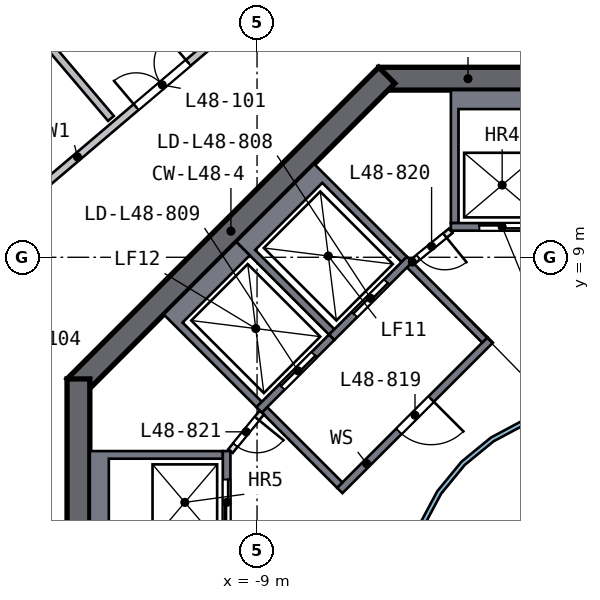
"""IFC4 building model, lengths in metres.
Left out: names, types, materials, properties, quantities, classifications, styles, units other than length and angle.
Written with IfcOpenShell. Run it as: python <this file> out.ifc"""

import sys

from ifc_helpers import new_model, si_unit, direction, frame, frame_2d, origin, place, context, subcontext, project, spatial, polyline, rectangle, outline, extrude, element, fill, save


model = new_model("IFC4")
c1 = context("Model", 3, precision=1e-05, world=origin(), true_north=direction((0.0, 1.0)))
c2 = subcontext(c1, "Body", "Model", "MODEL_VIEW")
j1 = project(units=[si_unit("LENGTHUNIT", "METRE"), si_unit("PLANEANGLEUNIT", "RADIAN")], contexts=[c1])
p1 = place(None, origin())
s1 = spatial("IfcSite", under=j1, at=p1, CompositionType="ELEMENT")
p2 = place(p1, origin())
s2 = spatial("IfcBuilding", under=s1, at=p2, CompositionType="ELEMENT")
p3 = place(p2, frame((0.0, 0.0, 197.5)))
s3 = spatial("IfcBuildingStorey", under=s2, at=p3, CompositionType="ELEMENT", Elevation=197.5)
p4 = place(p3, frame((5.799, 13.7, 0.0), z_axis=(0.0, 0.0, 1.0), x_axis=(-1.0, 0.0, 0.0)))
e1 = element("IfcWall", 1, at=p4, inside=s3, PredefinedType="SHEAR", context=c2, shape_type="SweptSolid", body=[
    extrude(rectangle(XDim=11.598, YDim=0.6, at=frame_2d((5.799, 0.0))), origin(), (0.0, 0.0, 1.0), 3.5),
])
p5 = place(p4, frame((4.899, 0.0, 0.0)))
e2 = element("IfcOpeningElement", 2, at=p5, cuts=e1, PredefinedType="OPENING", context=c2, shape_type="SweptSolid", body=[
    extrude(rectangle(XDim=1.8, YDim=2.1, at=frame_2d((0.9, 1.05))), frame((0.0, 0.31, 0.0), z_axis=(0.0, -1.0, 0.0), x_axis=(1.0, 0.0, 0.0)), (0.0, 0.0, 1.0), 0.62),
])
p6 = place(p3, frame((-5.587, 13.788, 0.0), z_axis=(0.0, 0.0, 1.0), x_axis=(-0.707106781, -0.707106781, 0.0)))
e3 = element("IfcWall", 3, at=p6, inside=s3, PredefinedType="SHEAR", context=c2, shape_type="SweptSolid", body=[
    extrude(rectangle(XDim=11.598, YDim=0.6, at=frame_2d((5.799, 0.0))), origin(), (0.0, 0.0, 1.0), 3.5),
])
p7 = place(p3, frame((-13.7, 5.799, 0.0), z_axis=(0.0, 0.0, 1.0), x_axis=(0.0, -1.0, 0.0)))
e4 = element("IfcWall", 4, at=p7, inside=s3, PredefinedType="SHEAR", context=c2, shape_type="SweptSolid", body=[
    extrude(rectangle(XDim=11.598, YDim=0.6, at=frame_2d((5.799, 0.0))), origin(), (0.0, 0.0, 1.0), 3.5),
])
p8 = place(p7, frame((4.899, 0.0, 0.0)))
e5 = element("IfcOpeningElement", 5, at=p8, cuts=e4, PredefinedType="OPENING", context=c2, shape_type="SweptSolid", body=[
    extrude(rectangle(XDim=1.8, YDim=2.1, at=frame_2d((0.9, 1.05))), frame((0.0, 0.31, 0.0), z_axis=(0.0, -1.0, 0.0), x_axis=(1.0, 0.0, 0.0)), (0.0, 0.0, 1.0), 0.62),
])
p9 = place(p3, origin())
e6 = element("IfcWall", 6, at=p9, inside=s3, PredefinedType="SOLIDWALL", context=c2, shape_type="SweptSolid", body=[
    extrude(outline(polyline([(-3.9, 13.4), (-1.2, 13.4), (-1.2, 9.9), (-1.4, 9.9), (-1.4, 12.9), (-3.7, 12.9), (-3.7, 9.9), (-3.9, 9.9), (-3.9, 13.4)])), origin(), (0.0, 0.0, 1.0), 3.19),
])
p10 = place(p3, frame((-1.2, 9.8, 0.0), z_axis=(0.0, 0.0, 1.0), x_axis=(-1.0, 0.0, 0.0)))
e7 = element("IfcWall", 7, at=p10, inside=s3, PredefinedType="SOLIDWALL", context=c2, shape_type="SweptSolid", body=[
    extrude(rectangle(XDim=2.7, YDim=0.2, at=frame_2d((1.35, 0.0))), origin(), (0.0, 0.0, 1.0), 3.19),
])
p11 = place(p10, frame((0.75, 0.0, 0.0)))
e8 = element("IfcOpeningElement", 8, at=p11, cuts=e7, PredefinedType="OPENING", context=c2, shape_type="SweptSolid", body=[
    extrude(rectangle(XDim=1.2, YDim=2.1, at=frame_2d((0.6, 1.05))), frame((0.0, 0.11, 0.0), z_axis=(0.0, -1.0, 0.0), x_axis=(1.0, 0.0, 0.0)), (0.0, 0.0, 1.0), 0.22),
])
p12 = place(p3, origin())
e9 = element("IfcWall", 9, at=p12, inside=s3, PredefinedType="SOLIDWALL", context=c2, shape_type="SweptSolid", body=[
    extrude(outline(polyline([(-13.4, 3.9), (-9.9, 3.9), (-9.9, 3.7), (-12.9, 3.7), (-12.9, 1.4), (-9.9, 1.4), (-9.9, 1.2), (-13.4, 1.2), (-13.4, 3.9)])), origin(), (0.0, 0.0, 1.0), 3.19),
])
p13 = place(p3, frame((-9.8, 1.2, 0.0), z_axis=(0.0, 0.0, 1.0), x_axis=(0.0, 1.0, 0.0)))
e10 = element("IfcWall", 10, at=p13, inside=s3, PredefinedType="SOLIDWALL", context=c2, shape_type="SweptSolid", body=[
    extrude(rectangle(XDim=2.7, YDim=0.2, at=frame_2d((1.35, 0.0))), origin(), (0.0, 0.0, 1.0), 3.19),
])
p14 = place(p13, frame((0.75, 0.0, 0.0)))
e11 = element("IfcOpeningElement", 11, at=p14, cuts=e10, PredefinedType="OPENING", context=c2, shape_type="SweptSolid", body=[
    extrude(rectangle(XDim=1.2, YDim=2.1, at=frame_2d((0.6, 1.05))), frame((0.0, 0.11, 0.0), z_axis=(0.0, -1.0, 0.0), x_axis=(1.0, 0.0, 0.0)), (0.0, 0.0, 1.0), 0.22),
])
p15 = place(p3, origin())
e12 = element("IfcWall", 12, at=p15, inside=s3, PredefinedType="SOLIDWALL", context=c2, shape_type="SweptSolid", body=[
    extrude(outline(polyline([(-9.546, 9.405), (-7.495, 11.455), (-5.056, 9.016), (-5.197, 8.874), (-7.283, 10.96), (-9.051, 9.192), (-6.965, 7.106), (-7.106, 6.965), (-9.546, 9.405)])), origin(), (0.0, 0.0, 1.0), 3.19),
])
p16 = place(p3, frame((-4.985, 8.945, 0.0), z_axis=(0.0, 0.0, 1.0), x_axis=(-0.707106781, -0.707106781, 0.0)))
e13 = element("IfcWall", 13, at=p16, inside=s3, PredefinedType="SOLIDWALL", context=c2, shape_type="SweptSolid", body=[
    extrude(rectangle(XDim=2.9, YDim=0.2, at=frame_2d((1.45, 0.0))), origin(), (0.0, 0.0, 1.0), 3.19),
])
p17 = place(p16, frame((0.85, 0.0, 0.0)))
e14 = element("IfcOpeningElement", 14, at=p17, cuts=e13, PredefinedType="OPENING", context=c2, shape_type="SweptSolid", body=[
    extrude(rectangle(XDim=1.2, YDim=2.1, at=frame_2d((0.6, 1.05))), frame((0.0, 0.11, 0.0), z_axis=(0.0, -1.0, 0.0), x_axis=(1.0, 0.0, 0.0)), (0.0, 0.0, 1.0), 0.22),
])
p18 = place(p3, origin())
e15 = element("IfcWall", 15, at=p18, inside=s3, PredefinedType="SOLIDWALL", context=c2, shape_type="SweptSolid", body=[
    extrude(outline(polyline([(-11.455, 7.495), (-9.546, 9.405), (-9.192, 9.051), (-10.96, 7.283), (-8.874, 5.197), (-9.016, 5.056), (-11.455, 7.495)])), origin(), (0.0, 0.0, 1.0), 3.19),
])
p19 = place(p3, frame((-7.036, 6.894, 0.0), z_axis=(0.0, 0.0, 1.0), x_axis=(-0.707106781, -0.707106781, 0.0)))
e16 = element("IfcWall", 16, at=p19, inside=s3, PredefinedType="SOLIDWALL", context=c2, shape_type="SweptSolid", body=[
    extrude(rectangle(XDim=2.7, YDim=0.2, at=frame_2d((1.35, 0.0))), origin(), (0.0, 0.0, 1.0), 3.19),
])
p20 = place(p19, frame((0.65, 0.0, 0.0)))
e17 = element("IfcOpeningElement", 17, at=p20, cuts=e16, PredefinedType="OPENING", context=c2, shape_type="SweptSolid", body=[
    extrude(rectangle(XDim=1.2, YDim=2.1, at=frame_2d((0.6, 1.05))), frame((0.0, 0.11, 0.0), z_axis=(0.0, -1.0, 0.0), x_axis=(1.0, 0.0, 0.0)), (0.0, 0.0, 1.0), 0.22),
])
p21 = place(p3, frame((-2.864, 6.823, 0.0), z_axis=(0.0, 0.0, 1.0), x_axis=(-0.707106781, -0.707106781, 0.0)))
e18 = element("IfcWall", 18, at=p21, inside=s3, PredefinedType="SOLIDWALL", context=c2, shape_type="SweptSolid", body=[
    extrude(rectangle(XDim=5.6, YDim=0.2, at=frame_2d((2.8, 0.0))), origin(), (0.0, 0.0, 1.0), 3.19),
])
p22 = place(p21, frame((2.2, 0.0, 0.0)))
e19 = element("IfcOpeningElement", 19, at=p22, cuts=e18, PredefinedType="OPENING", context=c2, shape_type="SweptSolid", body=[
    extrude(rectangle(XDim=1.2, YDim=2.1, at=frame_2d((0.6, 1.05))), frame((0.0, 0.11, 0.0), z_axis=(0.0, -1.0, 0.0), x_axis=(1.0, 0.0, 0.0)), (0.0, 0.0, 1.0), 0.22),
])
for number, where, z_axis, x_axis in (
    (20, (-3.005, 6.823, 0.0), (0.0, 0.0, 1.0), (-0.707, 0.707, 0.0)),
    (21, (-6.823, 3.005, 0.0), (0.0, 0.0, 1.0), (-0.707, 0.707, 0.0)),
):
    element("IfcWall", number, at=place(p3, frame(where, z_axis=z_axis, x_axis=x_axis)), inside=s3, PredefinedType="SOLIDWALL", context=c2, shape_type="SweptSolid", body=[
        extrude(rectangle(XDim=2.8, YDim=0.2, at=frame_2d((1.4, 0.0))), origin(), (0.0, 0.0, 1.0), 3.19),
    ])
p23 = place(p3, frame((-3.9, 9.7, 0.0), z_axis=(0.0, 0.0, 1.0), x_axis=(-0.775559878, -0.631274009, 0.0)))
e22 = element("IfcWall", 22, at=p23, inside=s3, PredefinedType="PARTITIONING", context=c2, shape_type="SweptSolid", body=[
    extrude(rectangle(XDim=1.308, YDim=0.15, at=frame_2d((0.654, 0.0))), origin(), (0.0, 0.0, 1.0), 3.19),
])
p24 = place(p23, frame((0.204, 0.0, 0.0)))
e23 = element("IfcOpeningElement", 23, at=p24, cuts=e22, PredefinedType="OPENING", context=c2, shape_type="SweptSolid", body=[
    extrude(rectangle(XDim=0.9, YDim=2.1, at=frame_2d((0.45, 1.05))), frame((0.0, 0.085, 0.0), z_axis=(0.0, -1.0, 0.0), x_axis=(1.0, 0.0, 0.0)), (0.0, 0.0, 1.0), 0.17),
])
p25 = place(p3, frame((-8.874, 4.914, 0.0), z_axis=(0.0, 0.0, 1.0), x_axis=(-0.631274009, -0.775559878, 0.0)))
e24 = element("IfcWall", 24, at=p25, inside=s3, PredefinedType="PARTITIONING", context=c2, shape_type="SweptSolid", body=[
    extrude(rectangle(XDim=1.308, YDim=0.15, at=frame_2d((0.654, 0.0))), origin(), (0.0, 0.0, 1.0), 3.19),
])
p26 = place(p25, frame((0.204, 0.0, 0.0)))
e25 = element("IfcOpeningElement", 25, at=p26, cuts=e24, PredefinedType="OPENING", context=c2, shape_type="SweptSolid", body=[
    extrude(rectangle(XDim=0.9, YDim=2.1, at=frame_2d((0.45, 1.05))), frame((0.0, 0.085, 0.0), z_axis=(0.0, -1.0, 0.0), x_axis=(1.0, 0.0, 0.0)), (0.0, 0.0, 1.0), 0.17),
])
p27 = place(p3, origin())
e26 = element("IfcWall", 26, at=p27, inside=s3, PredefinedType="SOLIDWALL", context=c2, shape_type="SweptSolid", body=[
    extrude(outline(polyline([(5.021, -0.999), (4.73, -1.959), (4.257, -2.844), (3.62, -3.62), (2.844, -4.257), (1.959, -4.73), (0.999, -5.021), (0.0, -5.12), (-0.999, -5.021), (-1.959, -4.73), (-2.844, -4.257), (-3.62, -3.62), (-4.257, -2.844), (-4.73, -1.959), (-5.021, -0.999), (-5.12, 0.0), (-5.021, 0.999), (-4.73, 1.959), (-4.257, 2.844), (-3.62, 3.62), (-2.844, 4.257), (-1.959, 4.73), (-0.999, 5.021), (0.0, 5.12), (0.999, 5.021), (1.959, 4.73), (2.844, 4.257), (3.62, 3.62), (4.257, 2.844), (4.73, 1.959), (5.021, 0.999), (5.12, 0.0), (5.021, -0.999)]), holes=[polyline([(4.904, 0.976), (4.619, 1.913), (4.157, 2.778), (3.535, 3.535), (2.778, 4.157), (1.913, 4.619), (0.976, 4.904), (0.0, 5.0), (-0.976, 4.904), (-1.913, 4.619), (-2.778, 4.157), (-3.535, 3.535), (-4.157, 2.778), (-4.619, 1.913), (-4.904, 0.976), (-5.0, 0.0), (-4.904, -0.976), (-4.619, -1.913), (-4.157, -2.778), (-3.535, -3.535), (-2.778, -4.157), (-1.913, -4.619), (-0.976, -4.904), (0.0, -5.0), (0.976, -4.904), (1.913, -4.619), (2.778, -4.157), (3.535, -3.535), (4.157, -2.778), (4.619, -1.913), (4.904, -0.976), (5.0, 0.0), (4.904, 0.976)])]), origin(), (0.0, 0.0, 1.0), 3.19),
])
p28 = place(p3, frame((-15.119, 10.461, 0.0), z_axis=(0.0, 0.0, 1.0), x_axis=(0.762438227, 0.64706101, 0.0)))
e27 = element("IfcWall", 27, at=p28, inside=s3, PredefinedType="SOLIDWALL", context=c2, shape_type="SweptSolid", body=[
    extrude(rectangle(XDim=9.317, YDim=0.2, at=frame_2d((4.658, 0.0))), origin(), (0.0, 0.0, 1.0), 3.19),
])
p29 = place(p28, frame((3.853, 0.0, 0.0)))
e28 = element("IfcOpeningElement", 28, at=p29, cuts=e27, PredefinedType="OPENING", context=c2, shape_type="SweptSolid", body=[
    extrude(rectangle(XDim=1.8, YDim=2.1, at=frame_2d((0.9, 1.05))), frame((0.0, 0.11, 0.0), z_axis=(0.0, -1.0, 0.0), x_axis=(1.0, 0.0, 0.0)), (0.0, 0.0, 1.0), 0.22),
])
p30 = place(p3, frame((-12.844, 12.654, 0.0), z_axis=(0.0, 0.0, 1.0), x_axis=(-0.647054482, 0.762443767, 0.0)))
e29 = element("IfcWall", 29, at=p30, inside=s3, PredefinedType="SOLIDWALL", context=c2, shape_type="SweptSolid", body=[
    extrude(rectangle(XDim=14.741, YDim=0.2, at=frame_2d((7.37, 0.0))), origin(), (0.0, 0.0, 1.0), 3.19),
])
p31 = place(p30, frame((4.6, 0.0, 0.0)))
e30 = element("IfcOpeningElement", 30, at=p31, cuts=e29, PredefinedType="OPENING", context=c2, shape_type="SweptSolid", body=[
    extrude(rectangle(XDim=1.0, YDim=2.1, at=frame_2d((0.5, 1.05))), frame((0.0, 0.11, 0.0), z_axis=(0.0, -1.0, 0.0), x_axis=(1.0, 0.0, 0.0)), (0.0, 0.0, 1.0), 0.22),
])
p32 = place(p11, origin())
e31 = element("IfcDoor", 31, at=p32, inside=s3, OperationType="DOUBLE_DOOR_SLIDING", PredefinedType="DOOR", context=c2, shape_type="SweptSolid", body=[
    extrude(rectangle(XDim=1.2, YDim=2.1, at=frame_2d((0.6, 1.05))), frame((0.0, 0.025, 0.0), z_axis=(0.0, -1.0, 0.0), x_axis=(1.0, 0.0, 0.0)), (0.0, 0.0, 1.0), 0.05),
])
fill(e8, e31)
p33 = place(p14, origin())
e32 = element("IfcDoor", 32, at=p33, inside=s3, OperationType="DOUBLE_DOOR_SLIDING", PredefinedType="DOOR", context=c2, shape_type="SweptSolid", body=[
    extrude(rectangle(XDim=1.2, YDim=2.1, at=frame_2d((0.6, 1.05))), frame((0.0, 0.025, 0.0), z_axis=(0.0, -1.0, 0.0), x_axis=(1.0, 0.0, 0.0)), (0.0, 0.0, 1.0), 0.05),
])
fill(e11, e32)
p34 = place(p17, origin())
e33 = element("IfcDoor", 33, at=p34, inside=s3, OperationType="DOUBLE_DOOR_SLIDING", PredefinedType="DOOR", context=c2, shape_type="SweptSolid", body=[
    extrude(rectangle(XDim=1.2, YDim=2.1, at=frame_2d((0.6, 1.05))), frame((0.0, 0.025, 0.0), z_axis=(0.0, -1.0, 0.0), x_axis=(1.0, 0.0, 0.0)), (0.0, 0.0, 1.0), 0.05),
])
fill(e14, e33)
p35 = place(p20, origin())
e34 = element("IfcDoor", 34, at=p35, inside=s3, OperationType="DOUBLE_DOOR_SLIDING", PredefinedType="DOOR", context=c2, shape_type="SweptSolid", body=[
    extrude(rectangle(XDim=1.2, YDim=2.1, at=frame_2d((0.6, 1.05))), frame((0.0, 0.025, 0.0), z_axis=(0.0, -1.0, 0.0), x_axis=(1.0, 0.0, 0.0)), (0.0, 0.0, 1.0), 0.05),
])
fill(e17, e34)
p36 = place(p22, origin())
e35 = element("IfcDoor", 35, at=p36, inside=s3, OperationType="SINGLE_SWING_LEFT", PredefinedType="DOOR", context=c2, shape_type="SweptSolid", body=[
    extrude(rectangle(XDim=1.2, YDim=2.1, at=frame_2d((0.6, 1.05))), frame((0.0, 0.025, 0.0), z_axis=(0.0, -1.0, 0.0), x_axis=(1.0, 0.0, 0.0)), (0.0, 0.0, 1.0), 0.05),
])
fill(e19, e35)
p37 = place(p24, origin())
e36 = element("IfcDoor", 36, at=p37, inside=s3, OperationType="SINGLE_SWING_LEFT", PredefinedType="DOOR", context=c2, shape_type="SweptSolid", body=[
    extrude(rectangle(XDim=0.9, YDim=2.1, at=frame_2d((0.45, 1.05))), frame((0.0, 0.025, 0.0), z_axis=(0.0, -1.0, 0.0), x_axis=(1.0, 0.0, 0.0)), (0.0, 0.0, 1.0), 0.05),
])
fill(e23, e36)
p38 = place(p26, origin())
e37 = element("IfcDoor", 37, at=p38, inside=s3, OperationType="SINGLE_SWING_LEFT", PredefinedType="DOOR", context=c2, shape_type="SweptSolid", body=[
    extrude(rectangle(XDim=0.9, YDim=2.1, at=frame_2d((0.45, 1.05))), frame((0.0, 0.025, 0.0), z_axis=(0.0, -1.0, 0.0), x_axis=(1.0, 0.0, 0.0)), (0.0, 0.0, 1.0), 0.05),
])
fill(e25, e37)
p39 = place(p29, origin())
e38 = element("IfcDoor", 38, at=p39, inside=s3, OperationType="DOUBLE_DOOR_SINGLE_SWING", PredefinedType="DOOR", context=c2, shape_type="SweptSolid", body=[
    extrude(rectangle(XDim=1.8, YDim=2.1, at=frame_2d((0.9, 1.05))), frame((0.0, 0.025, 0.0), z_axis=(0.0, -1.0, 0.0), x_axis=(1.0, 0.0, 0.0)), (0.0, 0.0, 1.0), 0.05),
])
fill(e28, e38)
save(model, sys.argv[1])
